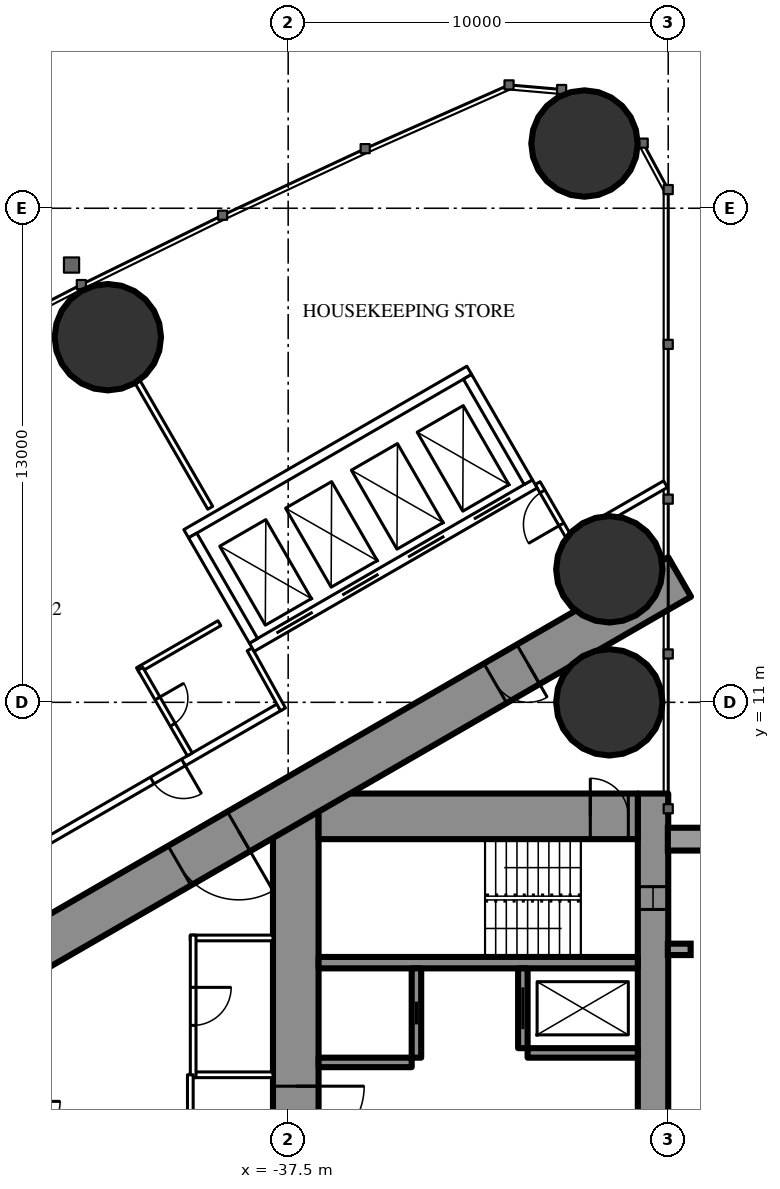
"""IFC4 building model, lengths in metres.
Left out: names, types, materials, properties, quantities, classifications, styles, units other than length and angle.
Written with IfcOpenShell. Run it as: python <this file> out.ifc"""

import sys

from ifc_helpers import new_model, si_unit, direction, frame, frame_2d, origin, origin_2d, place, context, subcontext, project, spatial, rectangle, hollow_circle, extrude, element, fill, save


model = new_model("IFC4")
c1 = context("Model", 3, precision=1e-05, world=origin(), true_north=direction((0.0, 1.0)))
c2 = subcontext(c1, "Body", "Model", "MODEL_VIEW")
j1 = project(units=[si_unit("LENGTHUNIT", "METRE"), si_unit("PLANEANGLEUNIT", "RADIAN")], contexts=[c1])
p1 = place(None, origin())
s1 = spatial("IfcSite", under=j1, at=p1, CompositionType="ELEMENT")
p2 = place(p1, origin())
s2 = spatial("IfcBuilding", under=s1, at=p2, CompositionType="ELEMENT")
p3 = place(p2, frame((0.0, 0.0, 39.0)))
s3 = spatial("IfcBuildingStorey", under=s2, at=p3, CompositionType="ELEMENT", Elevation=39.0)
for number, where, z_axis, x_axis in (
    (1, (-29.703, 25.703, 0.0), (0.0, 0.0, 1.0), (1.0, 0.0, 0.0)),
    (2, (-29.05, 11.0, 0.0), (0.0, 0.0, 1.0), (1.0, 0.0, 0.0)),
    (3, (-29.05, 14.5, 0.0), (0.0, 0.0, 1.0), (1.0, 0.0, 0.0)),
    (4, (-42.245, 20.607, 0.0), (0.0, 0.0, 1.0), (1.0, 0.0, 0.0)),
):
    element("IfcColumn", number, at=place(p3, frame(where, z_axis=z_axis, x_axis=x_axis)), inside=s3, PredefinedType="COLUMN", context=c2, shape_type="SweptSolid", body=[
        extrude(hollow_circle(Radius=1.4, WallThickness=0.12, at=origin_2d()), origin(), (0.0, 0.0, 1.0), 3.5),
    ])
p4 = place(p3, frame((-27.9, 8.6, 0.0), z_axis=(0.0, 0.0, 1.0), x_axis=(0.0, -1.0, 0.0)))
e5 = element("IfcWall", 5, at=p4, inside=s3, PredefinedType="SHEAR", context=c2, shape_type="SweptSolid", body=[
    extrude(rectangle(XDim=17.2, YDim=0.8, at=frame_2d((8.6, 0.0))), origin(), (0.0, 0.0, 1.0), 3.5),
])
p5 = place(p4, frame((2.45, 0.0, 0.6)))
e6 = element("IfcOpeningElement", 6, at=p5, cuts=e5, PredefinedType="OPENING", context=c2, shape_type="SweptSolid", body=[
    extrude(rectangle(XDim=0.6, YDim=2.1, at=frame_2d((0.3, 1.05))), frame((0.0, 0.41, 0.0), z_axis=(0.0, -1.0, 0.0), x_axis=(1.0, 0.0, 0.0)), (0.0, 0.0, 1.0), 0.82),
])
p6 = place(p4, frame((14.15, 0.0, 0.6)))
e7 = element("IfcOpeningElement", 7, at=p6, cuts=e5, PredefinedType="OPENING", context=c2, shape_type="SweptSolid", body=[
    extrude(rectangle(XDim=0.6, YDim=2.1, at=frame_2d((0.3, 1.05))), frame((0.0, 0.41, 0.0), z_axis=(0.0, -1.0, 0.0), x_axis=(1.0, 0.0, 0.0)), (0.0, 0.0, 1.0), 0.82),
])
p7 = place(p3, frame((-37.3, 8.6, 0.0), z_axis=(0.0, 0.0, 1.0), x_axis=(0.0, -1.0, 0.0)))
e8 = element("IfcWall", 8, at=p7, inside=s3, PredefinedType="SHEAR", context=c2, shape_type="SweptSolid", body=[
    extrude(rectangle(XDim=17.2, YDim=1.2, at=frame_2d((8.6, 0.0))), origin(), (0.0, 0.0, 1.0), 3.5),
])
p8 = place(p7, frame((7.7, 0.0, 0.0)))
e9 = element("IfcOpeningElement", 9, at=p8, cuts=e8, PredefinedType="OPENING", context=c2, shape_type="SweptSolid", body=[
    extrude(rectangle(XDim=1.8, YDim=2.2, at=frame_2d((0.9, 1.1))), frame((0.0, 0.61, 0.0), z_axis=(0.0, -1.0, 0.0), x_axis=(1.0, 0.0, 0.0)), (0.0, 0.0, 1.0), 1.22),
])
p9 = place(p3, frame((-28.3, 8.0, 0.0), z_axis=(0.0, 0.0, 1.0), x_axis=(-1.0, 0.0, 0.0)))
e10 = element("IfcWall", 10, at=p9, inside=s3, PredefinedType="SHEAR", context=c2, shape_type="SweptSolid", body=[
    extrude(rectangle(XDim=8.4, YDim=1.2, at=frame_2d((4.2, 0.0))), origin(), (0.0, 0.0, 1.0), 3.5),
])
p10 = place(p9, frame((0.25, 0.0, 0.0)))
e11 = element("IfcOpeningElement", 11, at=p10, cuts=e10, PredefinedType="OPENING", context=c2, shape_type="SweptSolid", body=[
    extrude(rectangle(XDim=1.0, YDim=2.2, at=frame_2d((0.5, 1.1))), frame((0.0, 0.61, 0.0), z_axis=(0.0, -1.0, 0.0), x_axis=(1.0, 0.0, 0.0)), (0.0, 0.0, 1.0), 1.22),
])
p11 = place(p3, frame((-28.3, 4.15, 0.0), z_axis=(0.0, 0.0, 1.0), x_axis=(-1.0, 0.0, 0.0)))
e12 = element("IfcWall", 12, at=p11, inside=s3, PredefinedType="SHEAR", context=c2, shape_type="SweptSolid", body=[
    extrude(rectangle(XDim=8.4, YDim=0.3, at=frame_2d((4.2, 0.0))), origin(), (0.0, 0.0, 1.0), 3.5),
])
p12 = place(p3, frame((-31.325, 4.0, 0.0), z_axis=(0.0, 0.0, 1.0), x_axis=(0.0, -1.0, 0.0)))
e13 = element("IfcWall", 13, at=p12, inside=s3, PredefinedType="SHEAR", context=c2, shape_type="SweptSolid", body=[
    extrude(rectangle(XDim=2.1, YDim=0.25, at=frame_2d((1.05, 0.0))), origin(), (0.0, 0.0, 1.0), 3.5),
])
p13 = place(p12, frame((0.5, 0.0, 0.0)))
e14 = element("IfcOpeningElement", 14, at=p13, cuts=e13, PredefinedType="OPENING", context=c2, shape_type="SweptSolid", body=[
    extrude(rectangle(XDim=1.1, YDim=2.2, at=frame_2d((0.55, 1.1))), frame((0.0, 0.135, 0.0), z_axis=(0.0, -1.0, 0.0), x_axis=(1.0, 0.0, 0.0)), (0.0, 0.0, 1.0), 0.27),
])
p14 = place(p3, frame((-34.125, 4.0, 0.0), z_axis=(0.0, 0.0, 1.0), x_axis=(0.0, -1.0, 0.0)))
e15 = element("IfcWall", 15, at=p14, inside=s3, PredefinedType="SHEAR", context=c2, shape_type="SweptSolid", body=[
    extrude(rectangle(XDim=2.35, YDim=0.25, at=frame_2d((1.175, 0.0))), origin(), (0.0, 0.0, 1.0), 3.5),
])
p15 = place(p14, frame((0.875, 0.0, 0.0)))
e16 = element("IfcOpeningElement", 16, at=p15, cuts=e15, PredefinedType="OPENING", context=c2, shape_type="SweptSolid", body=[
    extrude(rectangle(XDim=0.6, YDim=2.0, at=frame_2d((0.3, 1.0))), frame((0.0, 0.135, 0.0), z_axis=(0.0, -1.0, 0.0), x_axis=(1.0, 0.0, 0.0)), (0.0, 0.0, 1.0), 0.27),
])
p16 = place(p3, frame((-28.3, 1.775, 0.0), z_axis=(0.0, 0.0, 1.0), x_axis=(-1.0, 0.0, 0.0)))
e17 = element("IfcWall", 17, at=p16, inside=s3, PredefinedType="SHEAR", context=c2, shape_type="SweptSolid", body=[
    extrude(rectangle(XDim=2.9, YDim=0.25, at=frame_2d((1.45, 0.0))), origin(), (0.0, 0.0, 1.0), 3.5),
])
p17 = place(p3, frame((-34.25, 1.525, 0.0), z_axis=(0.0, 0.0, 1.0), x_axis=(-1.0, 0.0, 0.0)))
e18 = element("IfcWall", 18, at=p17, inside=s3, PredefinedType="SHEAR", context=c2, shape_type="SweptSolid", body=[
    extrude(rectangle(XDim=2.45, YDim=0.25, at=frame_2d((1.225, 0.0))), origin(), (0.0, 0.0, 1.0), 3.5),
])
p18 = place(p3, frame((-27.2, 14.3, 0.0), z_axis=(0.0, 0.0, 1.0), x_axis=(-0.866026593062, -0.499997940104, 0.0)))
e19 = element("IfcWall", 19, at=p18, inside=s3, PredefinedType="SHEAR", context=c2, shape_type="SweptSolid", body=[
    extrude(rectangle(XDim=28.946, YDim=1.2, at=frame_2d((14.473, 0.0))), origin(), (0.0, 0.0, 1.0), 3.5),
])
p19 = place(p18, frame((4.6, 0.0, 0.0)))
e20 = element("IfcOpeningElement", 20, at=p19, cuts=e19, PredefinedType="OPENING", context=c2, shape_type="SweptSolid", body=[
    extrude(rectangle(XDim=1.0, YDim=2.2, at=frame_2d((0.5, 1.1))), frame((0.0, 0.61, 0.0), z_axis=(0.0, -1.0, 0.0), x_axis=(1.0, 0.0, 0.0)), (0.0, 0.0, 1.0), 1.22),
])
p20 = place(p18, frame((13.395, 0.0, 0.0)))
e21 = element("IfcOpeningElement", 21, at=p20, cuts=e19, PredefinedType="OPENING", context=c2, shape_type="SweptSolid", body=[
    extrude(rectangle(XDim=1.8, YDim=2.2, at=frame_2d((0.9, 1.1))), frame((0.0, 0.61, 0.0), z_axis=(0.0, -1.0, 0.0), x_axis=(1.0, 0.0, 0.0)), (0.0, 0.0, 1.0), 1.22),
])
p21 = place(p3, frame((-39.551, 16.119, 0.0), z_axis=(0.0, 0.0, 1.0), x_axis=(-0.500014214979, 0.866017196607, 0.0)))
e22 = element("IfcWall", 22, at=p21, inside=s3, PredefinedType="PARTITIONING", context=c2, shape_type="SweptSolid", body=[
    extrude(rectangle(XDim=3.815, YDim=0.15, at=frame_2d((1.907, 0.0))), origin(), (0.0, 0.0, 1.0), 3.25),
])
p22 = place(p3, frame((-27.572, 16.741, 0.0), z_axis=(0.0, 0.0, 1.0), x_axis=(-0.866034618596, -0.499984039138, 0.0)))
e23 = element("IfcWall", 23, at=p22, inside=s3, PredefinedType="PARTITIONING", context=c2, shape_type="SweptSolid", body=[
    extrude(rectangle(XDim=2.854, YDim=0.2, at=frame_2d((1.427, 0.0))), origin(), (0.0, 0.0, 1.0), 3.25),
])
p23 = place(p3, frame((-37.7, 10.894, 0.0), z_axis=(0.0, 0.0, 1.0), x_axis=(-0.866027905338, -0.499995667157, 0.0)))
e24 = element("IfcWall", 24, at=p23, inside=s3, PredefinedType="PARTITIONING", context=c2, shape_type="SweptSolid", body=[
    extrude(rectangle(XDim=21.787, YDim=0.2, at=frame_2d((10.894, 0.0))), origin(), (0.0, 0.0, 1.0), 3.25),
])
p24 = place(p23, frame((11.78, 0.0, 0.0)))
e25 = element("IfcOpeningElement", 25, at=p24, cuts=e24, PredefinedType="OPENING", context=c2, shape_type="SweptSolid", body=[
    extrude(rectangle(XDim=0.95, YDim=2.2, at=frame_2d((0.475, 1.1))), frame((0.0, 0.11, 0.0), z_axis=(0.0, -1.0, 0.0), x_axis=(1.0, 0.0, 0.0)), (0.0, 0.0, 1.0), 0.22),
])
p25 = place(p23, frame((2.95, 0.0, 0.0)))
e26 = element("IfcOpeningElement", 26, at=p25, cuts=e24, PredefinedType="OPENING", context=c2, shape_type="SweptSolid", body=[
    extrude(rectangle(XDim=0.95, YDim=2.2, at=frame_2d((0.475, 1.1))), frame((0.0, 0.11, 0.0), z_axis=(0.0, -1.0, 0.0), x_axis=(1.0, 0.0, 0.0)), (0.0, 0.0, 1.0), 0.22),
])
p26 = place(p3, frame((-38.513, 12.392, 0.0), z_axis=(0.0, 0.0, 1.0), x_axis=(0.485585508183, -0.874189175317, 0.0)))
e27 = element("IfcWall", 27, at=p26, inside=s3, PredefinedType="PARTITIONING", context=c2, shape_type="SweptSolid", body=[
    extrude(rectangle(XDim=1.805, YDim=0.15, at=frame_2d((0.902, 0.0))), origin(), (0.0, 0.0, 1.0), 3.25),
])
p27 = place(p3, frame((-30.033, 15.205, 0.0), z_axis=(0.0, 0.0, 1.0), x_axis=(-0.499980071345, 0.866036909293, 0.0)))
e28 = element("IfcWall", 28, at=p27, inside=s3, PredefinedType="PARTITIONING", context=c2, shape_type="SweptSolid", body=[
    extrude(rectangle(XDim=1.805, YDim=0.15, at=frame_2d((0.902, 0.0))), origin(), (0.0, 0.0, 1.0), 3.25),
])
p28 = place(p27, frame((0.552, 0.0, 0.0)))
e29 = element("IfcOpeningElement", 29, at=p28, cuts=e28, PredefinedType="OPENING", context=c2, shape_type="SweptSolid", body=[
    extrude(rectangle(XDim=1.0, YDim=2.2, at=frame_2d((0.5, 1.1))), frame((0.0, 0.085, 0.0), z_axis=(0.0, -1.0, 0.0), x_axis=(1.0, 0.0, 0.0)), (0.0, 0.0, 1.0), 0.17),
])
p29 = place(p3, frame((-39.31, 13.082, 0.0), z_axis=(0.0, 0.0, 1.0), x_axis=(-0.866031185235, -0.4999899861, 0.0)))
e30 = element("IfcWall", 30, at=p29, inside=s3, PredefinedType="PARTITIONING", context=c2, shape_type="SweptSolid", body=[
    extrude(rectangle(XDim=2.475, YDim=0.15, at=frame_2d((1.238, 0.0))), origin(), (0.0, 0.0, 1.0), 3.25),
])
p30 = place(p3, frame((-40.088, 9.63, 0.0), z_axis=(0.0, 0.0, 1.0), x_axis=(-0.500006934395, 0.866021400173, 0.0)))
e31 = element("IfcWall", 31, at=p30, inside=s3, PredefinedType="PARTITIONING", context=c2, shape_type="SweptSolid", body=[
    extrude(rectangle(XDim=2.6, YDim=0.15, at=frame_2d((1.3, 0.0))), origin(), (0.0, 0.0, 1.0), 3.25),
])
p31 = place(p30, frame((0.9, 0.0, 0.0)))
e32 = element("IfcOpeningElement", 32, at=p31, cuts=e31, PredefinedType="OPENING", context=c2, shape_type="SweptSolid", body=[
    extrude(rectangle(XDim=0.8, YDim=2.2, at=frame_2d((0.4, 1.1))), frame((0.0, 0.085, 0.0), z_axis=(0.0, -1.0, 0.0), x_axis=(1.0, 0.0, 0.0)), (0.0, 0.0, 1.0), 0.17),
])
for number, where, z_axis, x_axis in (
    (33, (-37.9, 1.2, 0.0), (0.0, 0.0, 1.0), (-1.0, 0.0, 0.0)),
    (34, (-37.9, 4.8, 0.0), (0.0, 0.0, 1.0), (-1.0, 0.0, 0.0)),
):
    element("IfcWall", number, at=place(p3, frame(where, z_axis=z_axis, x_axis=x_axis)), inside=s3, PredefinedType="PARTITIONING", context=c2, shape_type="SweptSolid", body=[
        extrude(rectangle(XDim=2.175, YDim=0.15, at=frame_2d((1.087, 0.0))), origin(), (0.0, 0.0, 1.0), 3.25),
    ])
p32 = place(p3, frame((-40.0, 4.875, 0.0), z_axis=(0.0, 0.0, 1.0), x_axis=(0.0, -1.0, 0.0)))
e35 = element("IfcWall", 35, at=p32, inside=s3, PredefinedType="PARTITIONING", context=c2, shape_type="SweptSolid", body=[
    extrude(rectangle(XDim=3.75, YDim=0.15, at=frame_2d((1.875, 0.0))), origin(), (0.0, 0.0, 1.0), 3.25),
])
p33 = place(p32, frame((1.375, 0.0, 0.0)))
e36 = element("IfcOpeningElement", 36, at=p33, cuts=e35, PredefinedType="OPENING", context=c2, shape_type="SweptSolid", body=[
    extrude(rectangle(XDim=1.0, YDim=2.2, at=frame_2d((0.5, 1.1))), frame((0.0, 0.085, 0.0), z_axis=(0.0, -1.0, 0.0), x_axis=(1.0, 0.0, 0.0)), (0.0, 0.0, 1.0), 0.17),
])
p34 = place(p3, frame((-40.075, 1.2, 0.0), z_axis=(0.0, 0.0, 1.0), x_axis=(0.0, -1.0, 0.0)))
e37 = element("IfcWall", 37, at=p34, inside=s3, PredefinedType="PARTITIONING", context=c2, shape_type="SweptSolid", body=[
    extrude(rectangle(XDim=7.374, YDim=0.15, at=frame_2d((3.687, 0.0))), origin(), (0.0, 0.0, 1.0), 3.25),
])
p35 = place(p34, frame((2.787, 0.0, 0.0)))
e38 = element("IfcOpeningElement", 38, at=p35, cuts=e37, PredefinedType="OPENING", context=c2, shape_type="SweptSolid", body=[
    extrude(rectangle(XDim=1.8, YDim=2.2, at=frame_2d((0.9, 1.1))), frame((0.0, 0.085, 0.0), z_axis=(0.0, -1.0, 0.0), x_axis=(1.0, 0.0, 0.0)), (0.0, 0.0, 1.0), 0.17),
])
p36 = place(p3, frame((-31.01, 16.747, 0.0), z_axis=(0.0, 0.0, 1.0), x_axis=(-0.866028165386, -0.499995216735, 0.0)))
e39 = element("IfcWall", 39, at=p36, inside=s3, PredefinedType="PARTITIONING", context=c2, shape_type="SweptSolid", body=[
    extrude(rectangle(XDim=8.6, YDim=0.25, at=frame_2d((4.3, 0.0))), origin(), (0.0, 0.0, 1.0), 3.25),
])
p37 = place(p36, frame((0.75, 0.0, 0.0)))
e40 = element("IfcOpeningElement", 40, at=p37, cuts=e39, PredefinedType="OPENING", context=c2, shape_type="SweptSolid", body=[
    extrude(rectangle(XDim=1.1, YDim=2.2, at=frame_2d((0.55, 1.1))), frame((0.0, 0.135, 0.0), z_axis=(0.0, -1.0, 0.0), x_axis=(1.0, 0.0, 0.0)), (0.0, 0.0, 1.0), 0.27),
])
p38 = place(p36, frame((2.75, 0.0, 0.0)))
e41 = element("IfcOpeningElement", 41, at=p38, cuts=e39, PredefinedType="OPENING", context=c2, shape_type="SweptSolid", body=[
    extrude(rectangle(XDim=1.1, YDim=2.2, at=frame_2d((0.55, 1.1))), frame((0.0, 0.135, 0.0), z_axis=(0.0, -1.0, 0.0), x_axis=(1.0, 0.0, 0.0)), (0.0, 0.0, 1.0), 0.27),
])
p39 = place(p36, frame((4.75, 0.0, 0.0)))
e42 = element("IfcOpeningElement", 42, at=p39, cuts=e39, PredefinedType="OPENING", context=c2, shape_type="SweptSolid", body=[
    extrude(rectangle(XDim=1.1, YDim=2.2, at=frame_2d((0.55, 1.1))), frame((0.0, 0.135, 0.0), z_axis=(0.0, -1.0, 0.0), x_axis=(1.0, 0.0, 0.0)), (0.0, 0.0, 1.0), 0.27),
])
p40 = place(p36, frame((6.75, 0.0, 0.0)))
e43 = element("IfcOpeningElement", 43, at=p40, cuts=e39, PredefinedType="OPENING", context=c2, shape_type="SweptSolid", body=[
    extrude(rectangle(XDim=1.1, YDim=2.2, at=frame_2d((0.55, 1.1))), frame((0.0, 0.135, 0.0), z_axis=(0.0, -1.0, 0.0), x_axis=(1.0, 0.0, 0.0)), (0.0, 0.0, 1.0), 0.27),
])
p41 = place(p3, frame((-32.736, 19.736, 0.0), z_axis=(0.0, 0.0, 1.0), x_axis=(-0.866028165386, -0.499995216735, 0.0)))
e44 = element("IfcWall", 44, at=p41, inside=s3, PredefinedType="PARTITIONING", context=c2, shape_type="SweptSolid", body=[
    extrude(rectangle(XDim=8.6, YDim=0.25, at=frame_2d((4.3, 0.0))), origin(), (0.0, 0.0, 1.0), 3.25),
])
p42 = place(p3, frame((-31.181, 16.793, 0.0), z_axis=(0.0, 0.0, 1.0), x_axis=(-0.499929347863, 0.866066190972, 0.0)))
e45 = element("IfcWall", 45, at=p42, inside=s3, PredefinedType="PARTITIONING", context=c2, shape_type="SweptSolid", body=[
    extrude(rectangle(XDim=3.201, YDim=0.25, at=frame_2d((1.6, 0.0))), origin(), (0.0, 0.0, 1.0), 3.25),
])
p43 = place(p3, frame((-38.413, 12.618, 0.0), z_axis=(0.0, 0.0, 1.0), x_axis=(-0.499872130319, 0.866099216793, 0.0)))
e46 = element("IfcWall", 46, at=p43, inside=s3, PredefinedType="PARTITIONING", context=c2, shape_type="SweptSolid", body=[
    extrude(rectangle(XDim=3.2, YDim=0.25, at=frame_2d((1.6, 0.0))), origin(), (0.0, 0.0, 1.0), 3.25),
])
p44 = place(p31, origin())
e47 = element("IfcDoor", 47, at=p44, inside=s3, OperationType="SINGLE_SWING_RIGHT", PredefinedType="DOOR", context=c2, shape_type="SweptSolid", body=[
    extrude(rectangle(XDim=0.8, YDim=2.2, at=frame_2d((0.4, 1.1))), frame((0.0, 0.025, 0.0), z_axis=(0.0, -1.0, 0.0), x_axis=(1.0, 0.0, 0.0)), (0.0, 0.0, 1.0), 0.05),
])
fill(e32, e47)
p45 = place(p25, origin())
e48 = element("IfcDoor", 48, at=p45, inside=s3, OperationType="SINGLE_SWING_LEFT", PredefinedType="DOOR", context=c2, shape_type="SweptSolid", body=[
    extrude(rectangle(XDim=0.95, YDim=2.2, at=frame_2d((0.475, 1.1))), frame((0.0, 0.025, 0.0), z_axis=(0.0, -1.0, 0.0), x_axis=(1.0, 0.0, 0.0)), (0.0, 0.0, 1.0), 0.05),
])
fill(e26, e48)
p46 = place(p28, origin())
e49 = element("IfcDoor", 49, at=p46, inside=s3, OperationType="SINGLE_SWING_LEFT", PredefinedType="DOOR", context=c2, shape_type="SweptSolid", body=[
    extrude(rectangle(XDim=1.0, YDim=2.2, at=frame_2d((0.5, 1.1))), frame((0.0, 0.025, 0.0), z_axis=(0.0, -1.0, 0.0), x_axis=(1.0, 0.0, 0.0)), (0.0, 0.0, 1.0), 0.05),
])
fill(e29, e49)
p47 = place(p33, origin())
e50 = element("IfcDoor", 50, at=p47, inside=s3, OperationType="SINGLE_SWING_LEFT", PredefinedType="DOOR", context=c2, shape_type="SweptSolid", body=[
    extrude(rectangle(XDim=1.0, YDim=2.2, at=frame_2d((0.5, 1.1))), frame((0.0, 0.025, 0.0), z_axis=(0.0, -1.0, 0.0), x_axis=(1.0, 0.0, 0.0)), (0.0, 0.0, 1.0), 0.05),
])
fill(e36, e50)
p48 = place(p19, origin())
e51 = element("IfcDoor", 51, at=p48, inside=s3, OperationType="SINGLE_SWING_LEFT", PredefinedType="DOOR", context=c2, shape_type="SweptSolid", body=[
    extrude(rectangle(XDim=1.0, YDim=2.2, at=frame_2d((0.5, 1.1))), frame((0.0, 0.025, 0.0), z_axis=(0.0, -1.0, 0.0), x_axis=(1.0, 0.0, 0.0)), (0.0, 0.0, 1.0), 0.05),
])
fill(e20, e51)
p49 = place(p20, origin())
e52 = element("IfcDoor", 52, at=p49, inside=s3, OperationType="DOUBLE_DOOR_SINGLE_SWING", PredefinedType="DOOR", context=c2, shape_type="SweptSolid", body=[
    extrude(rectangle(XDim=1.8, YDim=2.2, at=frame_2d((0.9, 1.1))), frame((0.0, 0.025, 0.0), z_axis=(0.0, -1.0, 0.0), x_axis=(1.0, 0.0, 0.0)), (0.0, 0.0, 1.0), 0.05),
])
fill(e21, e52)
p50 = place(p8, origin())
e53 = element("IfcDoor", 53, at=p50, inside=s3, OperationType="DOUBLE_DOOR_SINGLE_SWING", PredefinedType="DOOR", context=c2, shape_type="SweptSolid", body=[
    extrude(rectangle(XDim=1.8, YDim=2.2, at=frame_2d((0.9, 1.1))), frame((0.0, 0.025, 0.0), z_axis=(0.0, -1.0, 0.0), x_axis=(1.0, 0.0, 0.0)), (0.0, 0.0, 1.0), 0.05),
])
fill(e9, e53)
p51 = place(p10, origin())
e54 = element("IfcDoor", 54, at=p51, inside=s3, OperationType="SINGLE_SWING_RIGHT", PredefinedType="DOOR", context=c2, shape_type="SweptSolid", body=[
    extrude(rectangle(XDim=1.0, YDim=2.2, at=frame_2d((0.5, 1.1))), frame((0.0, 0.025, 0.0), z_axis=(0.0, -1.0, 0.0), x_axis=(1.0, 0.0, 0.0)), (0.0, 0.0, 1.0), 0.05),
])
fill(e11, e54)
p52 = place(p13, origin())
e55 = element("IfcDoor", 55, at=p52, inside=s3, OperationType="SLIDING_TO_LEFT", PredefinedType="USERDEFINED", context=c2, shape_type="SweptSolid", body=[
    extrude(rectangle(XDim=1.1, YDim=2.2, at=frame_2d((0.55, 1.1))), frame((0.0, 0.025, 0.0), z_axis=(0.0, -1.0, 0.0), x_axis=(1.0, 0.0, 0.0)), (0.0, 0.0, 1.0), 0.05),
])
fill(e14, e55)
p53 = place(p15, origin())
e56 = element("IfcDoor", 56, at=p53, inside=s3, OperationType="SLIDING_TO_LEFT", PredefinedType="DOOR", context=c2, shape_type="SweptSolid", body=[
    extrude(rectangle(XDim=0.6, YDim=2.0, at=frame_2d((0.3, 1.0))), frame((0.0, 0.025, 0.0), z_axis=(0.0, -1.0, 0.0), x_axis=(1.0, 0.0, 0.0)), (0.0, 0.0, 1.0), 0.05),
])
fill(e16, e56)
p54 = place(p37, origin())
e57 = element("IfcDoor", 57, at=p54, inside=s3, OperationType="DOUBLE_DOOR_SLIDING", PredefinedType="USERDEFINED", context=c2, shape_type="SweptSolid", body=[
    extrude(rectangle(XDim=1.1, YDim=2.2, at=frame_2d((0.55, 1.1))), frame((0.0, 0.025, 0.0), z_axis=(0.0, -1.0, 0.0), x_axis=(1.0, 0.0, 0.0)), (0.0, 0.0, 1.0), 0.05),
])
fill(e40, e57)
p55 = place(p38, origin())
e58 = element("IfcDoor", 58, at=p55, inside=s3, OperationType="DOUBLE_DOOR_SLIDING", PredefinedType="USERDEFINED", context=c2, shape_type="SweptSolid", body=[
    extrude(rectangle(XDim=1.1, YDim=2.2, at=frame_2d((0.55, 1.1))), frame((0.0, 0.025, 0.0), z_axis=(0.0, -1.0, 0.0), x_axis=(1.0, 0.0, 0.0)), (0.0, 0.0, 1.0), 0.05),
])
fill(e41, e58)
p56 = place(p39, origin())
e59 = element("IfcDoor", 59, at=p56, inside=s3, OperationType="DOUBLE_DOOR_SLIDING", PredefinedType="USERDEFINED", context=c2, shape_type="SweptSolid", body=[
    extrude(rectangle(XDim=1.1, YDim=2.2, at=frame_2d((0.55, 1.1))), frame((0.0, 0.025, 0.0), z_axis=(0.0, -1.0, 0.0), x_axis=(1.0, 0.0, 0.0)), (0.0, 0.0, 1.0), 0.05),
])
fill(e42, e59)
p57 = place(p40, origin())
e60 = element("IfcDoor", 60, at=p57, inside=s3, OperationType="DOUBLE_DOOR_SLIDING", PredefinedType="USERDEFINED", context=c2, shape_type="SweptSolid", body=[
    extrude(rectangle(XDim=1.1, YDim=2.2, at=frame_2d((0.55, 1.1))), frame((0.0, 0.025, 0.0), z_axis=(0.0, -1.0, 0.0), x_axis=(1.0, 0.0, 0.0)), (0.0, 0.0, 1.0), 0.05),
])
fill(e43, e60)
p58 = place(p5, origin())
e61 = element("IfcWindow", 61, at=p58, inside=s3, PartitioningType="SINGLE_PANEL", PredefinedType="WINDOW", context=c2, shape_type="SweptSolid", body=[
    extrude(rectangle(XDim=0.6, YDim=2.1, at=frame_2d((0.3, 1.05))), frame((0.0, 0.03, 0.0), z_axis=(0.0, -1.0, 0.0), x_axis=(1.0, 0.0, 0.0)), (0.0, 0.0, 1.0), 0.06),
])
fill(e6, e61)
save(model, sys.argv[1])
